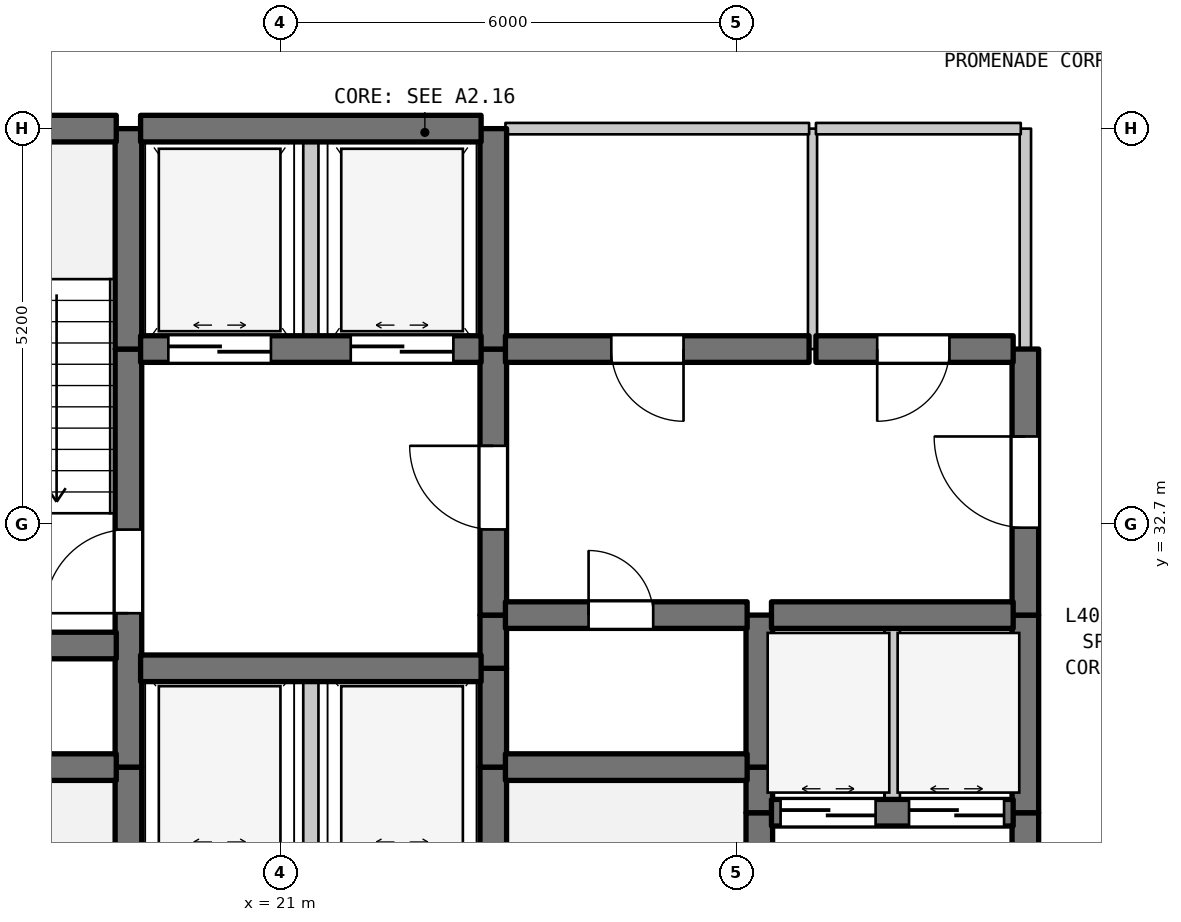
"""IFC4 building model, lengths in metres.
Left out: names, types, materials, properties, quantities, classifications, styles, units other than length and angle.
Written with IfcOpenShell. Run it as: python <this file> out.ifc"""

import sys

from ifc_helpers import new_model, si_unit, direction, frame, frame_2d, origin, place, context, subcontext, project, spatial, rectangle, extrude, element, fill, save


model = new_model("IFC4")
c1 = context("Model", 3, precision=1e-05, world=origin(), true_north=direction((0.0, 1.0)))
c2 = subcontext(c1, "Body", "Model", "MODEL_VIEW")
j1 = project(units=[si_unit("LENGTHUNIT", "METRE"), si_unit("PLANEANGLEUNIT", "RADIAN")], contexts=[c1])
p1 = place(None, origin())
s1 = spatial("IfcSite", under=j1, at=p1, CompositionType="ELEMENT")
p2 = place(p1, origin())
s2 = spatial("IfcBuilding", under=s1, at=p2, CompositionType="ELEMENT")
p3 = place(p2, frame((0.0, 0.0, 164.6)))
s3 = spatial("IfcBuildingStorey", under=s2, at=p3, CompositionType="ELEMENT", Elevation=164.6)
p4 = place(p3, frame((19.0, 28.2, 0.0), z_axis=(0.0, 0.0, 1.0), x_axis=(0.0, 1.0, 0.0)))
e1 = element("IfcWall", 1, at=p4, inside=s3, PredefinedType="SHEAR", context=c2, shape_type="SweptSolid", body=[
    extrude(rectangle(XDim=1.3, YDim=0.35, at=frame_2d((0.65, 0.0))), origin(), (0.0, 0.0, 1.0), 4.19),
])
p5 = place(p3, frame((19.0, 29.5, 0.0), z_axis=(0.0, 0.0, 1.0), x_axis=(0.0, 1.0, 0.0)))
e2 = element("IfcWall", 2, at=p5, inside=s3, PredefinedType="SHEAR", context=c2, shape_type="SweptSolid", body=[
    extrude(rectangle(XDim=5.5, YDim=0.35, at=frame_2d((2.75, 0.0))), origin(), (0.0, 0.0, 1.0), 4.19),
])
p6 = place(p5, frame((2.025, 0.0, 0.0)))
e3 = element("IfcOpeningElement", 3, at=p6, cuts=e2, PredefinedType="OPENING", context=c2, shape_type="SweptSolid", body=[
    extrude(rectangle(XDim=1.1, YDim=2.15, at=frame_2d((0.55, 1.075))), frame((0.0, 0.185, 0.0), z_axis=(0.0, -1.0, 0.0), x_axis=(1.0, 0.0, 0.0)), (0.0, 0.0, 1.0), 0.37),
])
p7 = place(p3, frame((19.0, 35.0, 0.0), z_axis=(0.0, 0.0, 1.0), x_axis=(0.0, 1.0, 0.0)))
e4 = element("IfcWall", 4, at=p7, inside=s3, PredefinedType="SHEAR", context=c2, shape_type="SweptSolid", body=[
    extrude(rectangle(XDim=2.9, YDim=0.35, at=frame_2d((1.45, 0.0))), origin(), (0.0, 0.0, 1.0), 4.19),
])
p8 = place(p3, frame((21.4, 28.2, 0.0), z_axis=(0.0, 0.0, 1.0), x_axis=(0.0, 1.0, 0.0)))
e5 = element("IfcWall", 5, at=p8, inside=s3, PredefinedType="STANDARD", context=c2, shape_type="SweptSolid", body=[
    extrude(rectangle(XDim=2.6, YDim=0.2, at=frame_2d((1.3, 0.0))), origin(), (0.0, 0.0, 1.0), 4.19),
])
p9 = place(p3, frame((21.4, 35.0, 0.0), z_axis=(0.0, 0.0, 1.0), x_axis=(0.0, 1.0, 0.0)))
e6 = element("IfcWall", 6, at=p9, inside=s3, PredefinedType="STANDARD", context=c2, shape_type="SweptSolid", body=[
    extrude(rectangle(XDim=2.9, YDim=0.2, at=frame_2d((1.45, 0.0))), origin(), (0.0, 0.0, 1.0), 4.19),
])
for number, where, z_axis, x_axis in (
    (7, (23.8, 28.2, 0.0), (0.0, 0.0, 1.0), (0.0, 1.0, 0.0)),
    (8, (23.8, 29.5, 0.0), (0.0, 0.0, 1.0), (0.0, 1.0, 0.0)),
):
    element("IfcWall", number, at=place(p3, frame(where, z_axis=z_axis, x_axis=x_axis)), inside=s3, PredefinedType="SHEAR", context=c2, shape_type="SweptSolid", body=[
        extrude(rectangle(XDim=1.3, YDim=0.35, at=frame_2d((0.65, 0.0))), origin(), (0.0, 0.0, 1.0), 4.19),
    ])
p10 = place(p3, frame((23.8, 30.8, 0.0), z_axis=(0.0, 0.0, 1.0), x_axis=(0.0, 1.0, 0.0)))
e9 = element("IfcWall", 9, at=p10, inside=s3, PredefinedType="SHEAR", context=c2, shape_type="SweptSolid", body=[
    extrude(rectangle(XDim=0.7, YDim=0.35, at=frame_2d((0.35, 0.0))), origin(), (0.0, 0.0, 1.0), 4.19),
])
p11 = place(p3, frame((23.8, 31.5, 0.0), z_axis=(0.0, 0.0, 1.0), x_axis=(0.0, 1.0, 0.0)))
e10 = element("IfcWall", 10, at=p11, inside=s3, PredefinedType="SHEAR", context=c2, shape_type="SweptSolid", body=[
    extrude(rectangle(XDim=3.5, YDim=0.35, at=frame_2d((1.75, 0.0))), origin(), (0.0, 0.0, 1.0), 4.19),
])
p12 = place(p11, frame((1.127, 0.0, 0.0)))
e11 = element("IfcOpeningElement", 11, at=p12, cuts=e10, PredefinedType="OPENING", context=c2, shape_type="SweptSolid", body=[
    extrude(rectangle(XDim=1.1, YDim=2.15, at=frame_2d((0.55, 1.075))), frame((0.0, 0.185, 0.0), z_axis=(0.0, -1.0, 0.0), x_axis=(1.0, 0.0, 0.0)), (0.0, 0.0, 1.0), 0.37),
])
p13 = place(p3, frame((23.8, 35.0, 0.0), z_axis=(0.0, 0.0, 1.0), x_axis=(0.0, 1.0, 0.0)))
e12 = element("IfcWall", 12, at=p13, inside=s3, PredefinedType="SHEAR", context=c2, shape_type="SweptSolid", body=[
    extrude(rectangle(XDim=2.9, YDim=0.35, at=frame_2d((1.45, 0.0))), origin(), (0.0, 0.0, 1.0), 4.19),
])
p14 = place(p3, frame((27.3, 25.6, 0.0), z_axis=(0.0, 0.0, 1.0), x_axis=(0.0, 1.0, 0.0)))
e13 = element("IfcWall", 13, at=p14, inside=s3, PredefinedType="SHEAR", context=c2, shape_type="SweptSolid", body=[
    extrude(rectangle(XDim=3.3, YDim=0.35, at=frame_2d((1.65, 0.0))), origin(), (0.0, 0.0, 1.0), 4.19),
])
p15 = place(p3, frame((27.3, 28.9, 0.0), z_axis=(0.0, 0.0, 1.0), x_axis=(0.0, 1.0, 0.0)))
e14 = element("IfcWall", 14, at=p15, inside=s3, PredefinedType="SHEAR", context=c2, shape_type="SweptSolid", body=[
    extrude(rectangle(XDim=0.6, YDim=0.35, at=frame_2d((0.3, 0.0))), origin(), (0.0, 0.0, 1.0), 4.19),
])
p16 = place(p3, frame((27.3, 29.5, 0.0), z_axis=(0.0, 0.0, 1.0), x_axis=(0.0, 1.0, 0.0)))
e15 = element("IfcWall", 15, at=p16, inside=s3, PredefinedType="SHEAR", context=c2, shape_type="SweptSolid", body=[
    extrude(rectangle(XDim=2.0, YDim=0.35, at=frame_2d((1.0, 0.0))), origin(), (0.0, 0.0, 1.0), 4.19),
])
p17 = place(p3, frame((28.0, 35.0, 0.0), z_axis=(0.0, 0.0, 1.0), x_axis=(0.0, 1.0, 0.0)))
e16 = element("IfcWall", 16, at=p17, inside=s3, PredefinedType="PARTITIONING", context=c2, shape_type="SweptSolid", body=[
    extrude(rectangle(XDim=2.9, YDim=0.12, at=frame_2d((1.45, 0.0))), origin(), (0.0, 0.0, 1.0), 4.19),
])
p18 = place(p3, frame((29.05, 28.9, 0.0), z_axis=(0.0, 0.0, 1.0), x_axis=(0.0, 1.0, 0.0)))
e17 = element("IfcWall", 17, at=p18, inside=s3, PredefinedType="STANDARD", context=c2, shape_type="SweptSolid", body=[
    extrude(rectangle(XDim=2.6, YDim=0.2, at=frame_2d((1.3, 0.0))), origin(), (0.0, 0.0, 1.0), 4.19),
])
p19 = place(p3, frame((30.8, 25.6, 0.0), z_axis=(0.0, 0.0, 1.0), x_axis=(0.0, 1.0, 0.0)))
e18 = element("IfcWall", 18, at=p19, inside=s3, PredefinedType="SHEAR", context=c2, shape_type="SweptSolid", body=[
    extrude(rectangle(XDim=3.3, YDim=0.35, at=frame_2d((1.65, 0.0))), origin(), (0.0, 0.0, 1.0), 4.19),
])
p20 = place(p19, frame((0.978, 0.0, 0.0)))
e19 = element("IfcOpeningElement", 19, at=p20, cuts=e18, PredefinedType="OPENING", context=c2, shape_type="SweptSolid", body=[
    extrude(rectangle(XDim=1.2, YDim=2.2, at=frame_2d((0.6, 1.1))), frame((0.0, 0.185, 0.0), z_axis=(0.0, -1.0, 0.0), x_axis=(1.0, 0.0, 0.0)), (0.0, 0.0, 1.0), 0.37),
])
p21 = place(p3, frame((30.8, 28.9, 0.0), z_axis=(0.0, 0.0, 1.0), x_axis=(0.0, 1.0, 0.0)))
e20 = element("IfcWall", 20, at=p21, inside=s3, PredefinedType="SHEAR", context=c2, shape_type="SweptSolid", body=[
    extrude(rectangle(XDim=2.6, YDim=0.35, at=frame_2d((1.3, 0.0))), origin(), (0.0, 0.0, 1.0), 4.19),
])
p22 = place(p3, frame((30.8, 31.5, 0.0), z_axis=(0.0, 0.0, 1.0), x_axis=(0.0, 1.0, 0.0)))
e21 = element("IfcWall", 21, at=p22, inside=s3, PredefinedType="SHEAR", context=c2, shape_type="SweptSolid", body=[
    extrude(rectangle(XDim=3.5, YDim=0.35, at=frame_2d((1.75, 0.0))), origin(), (0.0, 0.0, 1.0), 4.19),
])
p23 = place(p22, frame((1.15, 0.0, 0.0)))
e22 = element("IfcOpeningElement", 22, at=p23, cuts=e21, PredefinedType="OPENING", context=c2, shape_type="SweptSolid", body=[
    extrude(rectangle(XDim=1.2, YDim=2.2, at=frame_2d((0.6, 1.1))), frame((0.0, 0.185, 0.0), z_axis=(0.0, -1.0, 0.0), x_axis=(1.0, 0.0, 0.0)), (0.0, 0.0, 1.0), 0.37),
])
p24 = place(p3, frame((30.8, 35.0, 0.0), z_axis=(0.0, 0.0, 1.0), x_axis=(0.0, 1.0, 0.0)))
e23 = element("IfcWall", 23, at=p24, inside=s3, PredefinedType="STANDARD", context=c2, shape_type="SweptSolid", body=[
    extrude(rectangle(XDim=2.9, YDim=0.15, at=frame_2d((1.45, 0.0))), origin(), (0.0, 0.0, 1.0), 4.19),
])
p25 = place(p3, frame((27.46, 28.9, 0.0), z_axis=(0.0, 0.0, 1.0), x_axis=(1.0, 0.0, 0.0)))
e24 = element("IfcWall", 24, at=p25, inside=s3, PredefinedType="SHEAR", context=c2, shape_type="SweptSolid", body=[
    extrude(rectangle(XDim=3.18, YDim=0.35, at=frame_2d((1.59, 0.0))), origin(), (0.0, 0.0, 1.0), 4.19),
])
p26 = place(p25, frame((0.12, 0.0, 0.0)))
e25 = element("IfcOpeningElement", 25, at=p26, cuts=e24, PredefinedType="OPENING", context=c2, shape_type="SweptSolid", body=[
    extrude(rectangle(XDim=1.25, YDim=2.2, at=frame_2d((0.625, 1.1))), frame((0.0, 0.185, 0.0), z_axis=(0.0, -1.0, 0.0), x_axis=(1.0, 0.0, 0.0)), (0.0, 0.0, 1.0), 0.37),
])
p27 = place(p25, frame((1.81, 0.0, 0.0)))
e26 = element("IfcOpeningElement", 26, at=p27, cuts=e24, PredefinedType="OPENING", context=c2, shape_type="SweptSolid", body=[
    extrude(rectangle(XDim=1.25, YDim=2.2, at=frame_2d((0.625, 1.1))), frame((0.0, 0.185, 0.0), z_axis=(0.0, -1.0, 0.0), x_axis=(1.0, 0.0, 0.0)), (0.0, 0.0, 1.0), 0.37),
])
p28 = place(p3, frame((15.16, 29.5, 0.0), z_axis=(0.0, 0.0, 1.0), x_axis=(1.0, 0.0, 0.0)))
e27 = element("IfcWall", 27, at=p28, inside=s3, PredefinedType="SHEAR", context=c2, shape_type="SweptSolid", body=[
    extrude(rectangle(XDim=3.68, YDim=0.35, at=frame_2d((1.84, 0.0))), origin(), (0.0, 0.0, 1.0), 4.19),
])
p29 = place(p3, frame((23.96, 29.5, 0.0), z_axis=(0.0, 0.0, 1.0), x_axis=(1.0, 0.0, 0.0)))
e28 = element("IfcWall", 28, at=p29, inside=s3, PredefinedType="SHEAR", context=c2, shape_type="SweptSolid", body=[
    extrude(rectangle(XDim=3.18, YDim=0.35, at=frame_2d((1.59, 0.0))), origin(), (0.0, 0.0, 1.0), 4.19),
])
p30 = place(p3, frame((19.16, 30.8, 0.0), z_axis=(0.0, 0.0, 1.0), x_axis=(1.0, 0.0, 0.0)))
e29 = element("IfcWall", 29, at=p30, inside=s3, PredefinedType="SHEAR", context=c2, shape_type="SweptSolid", body=[
    extrude(rectangle(XDim=4.48, YDim=0.35, at=frame_2d((2.24, 0.0))), origin(), (0.0, 0.0, 1.0), 4.19),
])
p31 = place(p3, frame((15.16, 31.1, 0.0), z_axis=(0.0, 0.0, 1.0), x_axis=(1.0, 0.0, 0.0)))
e30 = element("IfcWall", 30, at=p31, inside=s3, PredefinedType="SHEAR", context=c2, shape_type="SweptSolid", body=[
    extrude(rectangle(XDim=3.68, YDim=0.35, at=frame_2d((1.84, 0.0))), origin(), (0.0, 0.0, 1.0), 4.19),
])
p32 = place(p3, frame((23.96, 31.5, 0.0), z_axis=(0.0, 0.0, 1.0), x_axis=(1.0, 0.0, 0.0)))
e31 = element("IfcWall", 31, at=p32, inside=s3, PredefinedType="SHEAR", context=c2, shape_type="SweptSolid", body=[
    extrude(rectangle(XDim=3.18, YDim=0.35, at=frame_2d((1.59, 0.0))), origin(), (0.0, 0.0, 1.0), 4.19),
])
p33 = place(p32, frame((1.094, 0.0, 0.0)))
e32 = element("IfcOpeningElement", 32, at=p33, cuts=e31, PredefinedType="OPENING", context=c2, shape_type="SweptSolid", body=[
    extrude(rectangle(XDim=0.85, YDim=2.1, at=frame_2d((0.425, 1.05))), frame((0.0, 0.185, 0.0), z_axis=(0.0, -1.0, 0.0), x_axis=(1.0, 0.0, 0.0)), (0.0, 0.0, 1.0), 0.37),
])
p34 = place(p3, frame((27.46, 31.5, 0.0), z_axis=(0.0, 0.0, 1.0), x_axis=(1.0, 0.0, 0.0)))
e33 = element("IfcWall", 33, at=p34, inside=s3, PredefinedType="SHEAR", context=c2, shape_type="SweptSolid", body=[
    extrude(rectangle(XDim=3.18, YDim=0.35, at=frame_2d((1.59, 0.0))), origin(), (0.0, 0.0, 1.0), 4.19),
])
p35 = place(p3, frame((19.16, 35.0, 0.0), z_axis=(0.0, 0.0, 1.0), x_axis=(1.0, 0.0, 0.0)))
e34 = element("IfcWall", 34, at=p35, inside=s3, PredefinedType="SHEAR", context=c2, shape_type="SweptSolid", body=[
    extrude(rectangle(XDim=4.48, YDim=0.35, at=frame_2d((2.24, 0.0))), origin(), (0.0, 0.0, 1.0), 4.19),
])
p36 = place(p35, frame((0.365, 0.0, 0.0)))
e35 = element("IfcOpeningElement", 35, at=p36, cuts=e34, PredefinedType="OPENING", context=c2, shape_type="SweptSolid", body=[
    extrude(rectangle(XDim=1.35, YDim=2.2, at=frame_2d((0.675, 1.1))), frame((0.0, 0.185, 0.0), z_axis=(0.0, -1.0, 0.0), x_axis=(1.0, 0.0, 0.0)), (0.0, 0.0, 1.0), 0.37),
])
p37 = place(p35, frame((2.765, 0.0, 0.0)))
e36 = element("IfcOpeningElement", 36, at=p37, cuts=e34, PredefinedType="OPENING", context=c2, shape_type="SweptSolid", body=[
    extrude(rectangle(XDim=1.35, YDim=2.2, at=frame_2d((0.675, 1.1))), frame((0.0, 0.185, 0.0), z_axis=(0.0, -1.0, 0.0), x_axis=(1.0, 0.0, 0.0)), (0.0, 0.0, 1.0), 0.37),
])
p38 = place(p3, frame((23.96, 35.0, 0.0), z_axis=(0.0, 0.0, 1.0), x_axis=(1.0, 0.0, 0.0)))
e37 = element("IfcWall", 37, at=p38, inside=s3, PredefinedType="SHEAR", context=c2, shape_type="SweptSolid", body=[
    extrude(rectangle(XDim=3.995, YDim=0.35, at=frame_2d((1.998, 0.0))), origin(), (0.0, 0.0, 1.0), 4.19),
])
p39 = place(p38, frame((1.393, 0.0, 0.0)))
e38 = element("IfcOpeningElement", 38, at=p39, cuts=e37, PredefinedType="OPENING", context=c2, shape_type="SweptSolid", body=[
    extrude(rectangle(XDim=0.95, YDim=2.15, at=frame_2d((0.475, 1.075))), frame((0.0, 0.185, 0.0), z_axis=(0.0, -1.0, 0.0), x_axis=(1.0, 0.0, 0.0)), (0.0, 0.0, 1.0), 0.37),
])
p40 = place(p3, frame((28.045, 35.0, 0.0), z_axis=(0.0, 0.0, 1.0), x_axis=(1.0, 0.0, 0.0)))
e39 = element("IfcWall", 39, at=p40, inside=s3, PredefinedType="SHEAR", context=c2, shape_type="SweptSolid", body=[
    extrude(rectangle(XDim=2.595, YDim=0.35, at=frame_2d((1.297, 0.0))), origin(), (0.0, 0.0, 1.0), 4.19),
])
p41 = place(p40, frame((0.806, 0.0, 0.0)))
e40 = element("IfcOpeningElement", 40, at=p41, cuts=e39, PredefinedType="OPENING", context=c2, shape_type="SweptSolid", body=[
    extrude(rectangle(XDim=0.95, YDim=2.15, at=frame_2d((0.475, 1.075))), frame((0.0, 0.185, 0.0), z_axis=(0.0, -1.0, 0.0), x_axis=(1.0, 0.0, 0.0)), (0.0, 0.0, 1.0), 0.37),
])
p42 = place(p3, frame((15.16, 37.9, 0.0), z_axis=(0.0, 0.0, 1.0), x_axis=(1.0, 0.0, 0.0)))
e41 = element("IfcWall", 41, at=p42, inside=s3, PredefinedType="SHEAR", context=c2, shape_type="SweptSolid", body=[
    extrude(rectangle(XDim=3.68, YDim=0.35, at=frame_2d((1.84, 0.0))), origin(), (0.0, 0.0, 1.0), 4.19),
])
p43 = place(p3, frame((19.16, 37.9, 0.0), z_axis=(0.0, 0.0, 1.0), x_axis=(1.0, 0.0, 0.0)))
e42 = element("IfcWall", 42, at=p43, inside=s3, PredefinedType="SHEAR", context=c2, shape_type="SweptSolid", body=[
    extrude(rectangle(XDim=4.48, YDim=0.35, at=frame_2d((2.24, 0.0))), origin(), (0.0, 0.0, 1.0), 4.19),
])
p44 = place(p3, frame((23.96, 37.9, 0.0), z_axis=(0.0, 0.0, 1.0), x_axis=(1.0, 0.0, 0.0)))
e43 = element("IfcWall", 43, at=p44, inside=s3, PredefinedType="STANDARD", context=c2, shape_type="SweptSolid", body=[
    extrude(rectangle(XDim=3.995, YDim=0.15, at=frame_2d((1.998, 0.0))), origin(), (0.0, 0.0, 1.0), 3.69),
])
p45 = place(p3, frame((28.045, 37.9, 0.0), z_axis=(0.0, 0.0, 1.0), x_axis=(1.0, 0.0, 0.0)))
e44 = element("IfcWall", 44, at=p45, inside=s3, PredefinedType="STANDARD", context=c2, shape_type="SweptSolid", body=[
    extrude(rectangle(XDim=2.695, YDim=0.15, at=frame_2d((1.348, 0.0))), origin(), (0.0, 0.0, 1.0), 3.69),
])
p46 = place(p6, origin())
e45 = element("IfcDoor", 45, at=p46, inside=s3, OperationType="SINGLE_SWING_LEFT", PredefinedType="DOOR", context=c2, shape_type="SweptSolid", body=[
    extrude(rectangle(XDim=1.1, YDim=2.15, at=frame_2d((0.55, 1.075))), frame((0.0, 0.025, 0.0), z_axis=(0.0, -1.0, 0.0), x_axis=(1.0, 0.0, 0.0)), (0.0, 0.0, 1.0), 0.05),
])
fill(e3, e45)
p47 = place(p12, origin())
e46 = element("IfcDoor", 46, at=p47, inside=s3, OperationType="SINGLE_SWING_RIGHT", PredefinedType="DOOR", context=c2, shape_type="SweptSolid", body=[
    extrude(rectangle(XDim=1.1, YDim=2.15, at=frame_2d((0.55, 1.075))), frame((0.0, 0.025, 0.0), z_axis=(0.0, -1.0, 0.0), x_axis=(1.0, 0.0, 0.0)), (0.0, 0.0, 1.0), 0.05),
])
fill(e11, e46)
p48 = place(p23, origin())
e47 = element("IfcDoor", 47, at=p48, inside=s3, OperationType="SINGLE_SWING_RIGHT", PredefinedType="DOOR", context=c2, shape_type="SweptSolid", body=[
    extrude(rectangle(XDim=1.2, YDim=2.2, at=frame_2d((0.6, 1.1))), frame((0.0, 0.025, 0.0), z_axis=(0.0, -1.0, 0.0), x_axis=(1.0, 0.0, 0.0)), (0.0, 0.0, 1.0), 0.05),
])
fill(e22, e47)
p49 = place(p26, origin())
e48 = element("IfcDoor", 48, at=p49, inside=s3, OperationType="DOUBLE_DOOR_SLIDING", PredefinedType="DOOR", context=c2, shape_type="SweptSolid", body=[
    extrude(rectangle(XDim=1.25, YDim=2.2, at=frame_2d((0.625, 1.1))), frame((0.0, 0.025, 0.0), z_axis=(0.0, -1.0, 0.0), x_axis=(1.0, 0.0, 0.0)), (0.0, 0.0, 1.0), 0.05),
])
fill(e25, e48)
p50 = place(p27, origin())
e49 = element("IfcDoor", 49, at=p50, inside=s3, OperationType="DOUBLE_DOOR_SLIDING", PredefinedType="DOOR", context=c2, shape_type="SweptSolid", body=[
    extrude(rectangle(XDim=1.25, YDim=2.2, at=frame_2d((0.625, 1.1))), frame((0.0, 0.025, 0.0), z_axis=(0.0, -1.0, 0.0), x_axis=(1.0, 0.0, 0.0)), (0.0, 0.0, 1.0), 0.05),
])
fill(e26, e49)
p51 = place(p33, origin())
e50 = element("IfcDoor", 50, at=p51, inside=s3, OperationType="SINGLE_SWING_LEFT", PredefinedType="DOOR", context=c2, shape_type="SweptSolid", body=[
    extrude(rectangle(XDim=0.85, YDim=2.1, at=frame_2d((0.425, 1.05))), frame((0.0, 0.025, 0.0), z_axis=(0.0, -1.0, 0.0), x_axis=(1.0, 0.0, 0.0)), (0.0, 0.0, 1.0), 0.05),
])
fill(e32, e50)
p52 = place(p36, origin())
e51 = element("IfcDoor", 51, at=p52, inside=s3, OperationType="DOUBLE_DOOR_SLIDING", PredefinedType="DOOR", context=c2, shape_type="SweptSolid", body=[
    extrude(rectangle(XDim=1.35, YDim=2.2, at=frame_2d((0.675, 1.1))), frame((0.0, 0.025, 0.0), z_axis=(0.0, -1.0, 0.0), x_axis=(1.0, 0.0, 0.0)), (0.0, 0.0, 1.0), 0.05),
])
fill(e35, e51)
p53 = place(p37, origin())
e52 = element("IfcDoor", 52, at=p53, inside=s3, OperationType="DOUBLE_DOOR_SLIDING", PredefinedType="DOOR", context=c2, shape_type="SweptSolid", body=[
    extrude(rectangle(XDim=1.35, YDim=2.2, at=frame_2d((0.675, 1.1))), frame((0.0, 0.025, 0.0), z_axis=(0.0, -1.0, 0.0), x_axis=(1.0, 0.0, 0.0)), (0.0, 0.0, 1.0), 0.05),
])
fill(e36, e52)
p54 = place(p39, frame((0.95, 0.0, 0.0), z_axis=(0.0, 0.0, 1.0), x_axis=(-1.0, 0.0, 0.0)))
e53 = element("IfcDoor", 53, at=p54, inside=s3, OperationType="SINGLE_SWING_RIGHT", PredefinedType="DOOR", context=c2, shape_type="SweptSolid", body=[
    extrude(rectangle(XDim=0.95, YDim=2.15, at=frame_2d((0.475, 1.075))), frame((0.0, 0.025, 0.0), z_axis=(0.0, -1.0, 0.0), x_axis=(1.0, 0.0, 0.0)), (0.0, 0.0, 1.0), 0.05),
])
fill(e38, e53)
p55 = place(p41, frame((0.95, 0.0, 0.0), z_axis=(0.0, 0.0, 1.0), x_axis=(-1.0, 0.0, 0.0)))
e54 = element("IfcDoor", 54, at=p55, inside=s3, OperationType="SINGLE_SWING_LEFT", PredefinedType="DOOR", context=c2, shape_type="SweptSolid", body=[
    extrude(rectangle(XDim=0.95, YDim=2.15, at=frame_2d((0.475, 1.075))), frame((0.0, 0.025, 0.0), z_axis=(0.0, -1.0, 0.0), x_axis=(1.0, 0.0, 0.0)), (0.0, 0.0, 1.0), 0.05),
])
fill(e40, e54)
save(model, sys.argv[1])
